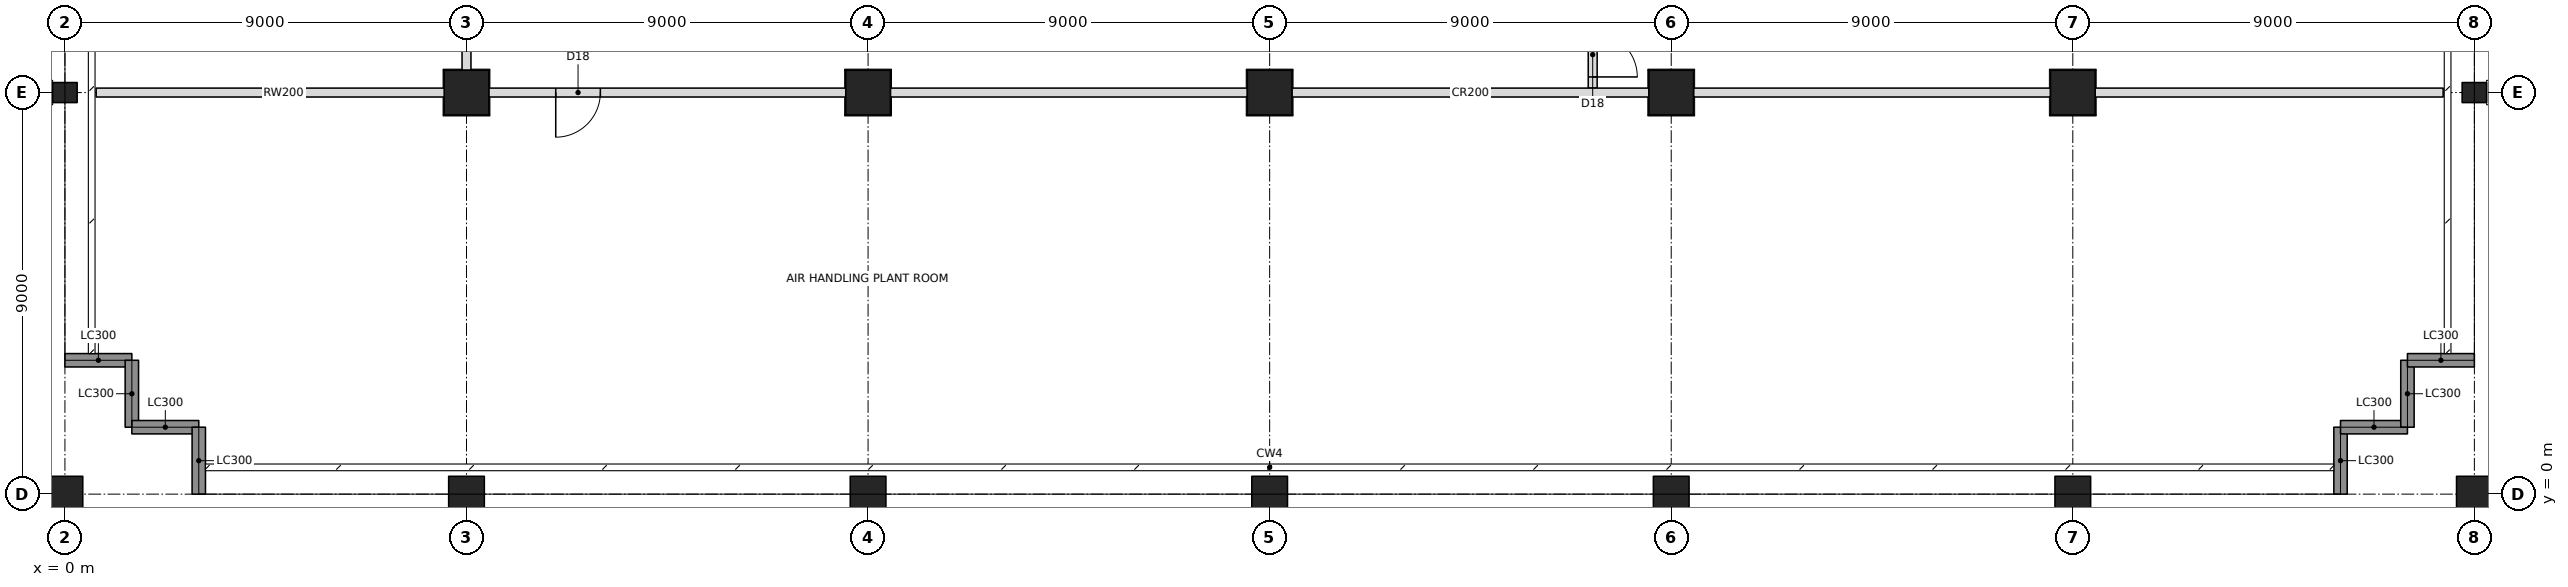
"""IFC4 building model, lengths in metres.
Left out: names, types, materials, properties, quantities, classifications, styles, units other than length and angle.
Written with IfcOpenShell. Run it as: python <this file> out.ifc"""

import sys

from ifc_helpers import new_model, si_unit, direction, frame, frame_2d, origin, origin_with_axes, origin_2d, place, context, subcontext, project, spatial, rectangle, hollow_rectangle, i_section, extrude, element, fill, save


model = new_model("IFC4")
c1 = context("Model", 3, precision=1e-05, world=origin(), true_north=direction((0.0, 1.0)))
c2 = subcontext(c1, "Body", "Model", "MODEL_VIEW")
j1 = project(units=[si_unit("LENGTHUNIT", "METRE"), si_unit("PLANEANGLEUNIT", "RADIAN")], contexts=[c1])
p1 = place(None, origin())
s1 = spatial("IfcSite", under=j1, at=p1, CompositionType="ELEMENT")
p2 = place(p1, origin())
s2 = spatial("IfcBuilding", under=s1, at=p2, CompositionType="ELEMENT")
p3 = place(p2, frame((0.0, 0.0, 89.2)))
s3 = spatial("IfcBuildingStorey", under=s2, at=p3, CompositionType="ELEMENT", Elevation=89.2)
p4 = place(p3, origin_with_axes())
e1 = element("IfcColumn", 1, at=p4, inside=s3, PredefinedType="COLUMN", context=c2, shape_type="SweptSolid", body=[
    extrude(hollow_rectangle(XDim=0.8, YDim=0.8, WallThickness=0.07, at=origin_2d()), origin(), (0.0, 0.0, 1.0), 5.0),
])
p5 = place(p3, frame((0.0, 9.0, 0.0), z_axis=(0.0, 0.0, 1.0), x_axis=(0.0, 1.0, 0.0)))
e2 = element("IfcColumn", 2, at=p5, inside=s3, PredefinedType="COLUMN", context=c2, shape_type="SweptSolid", body=[
    extrude(i_section(OverallWidth=0.449, OverallDepth=0.549, WebThickness=0.072, FlangeThickness=0.115, at=origin_2d()), origin(), (0.0, 0.0, 1.0), 5.0),
])
p6 = place(p3, frame((9.0, 0.0, 0.0), z_axis=(0.0, 0.0, 1.0), x_axis=(1.0, 0.0, 0.0)))
e3 = element("IfcColumn", 3, at=p6, inside=s3, PredefinedType="COLUMN", context=c2, shape_type="SweptSolid", body=[
    extrude(hollow_rectangle(XDim=0.8, YDim=0.8, WallThickness=0.07, at=origin_2d()), origin(), (0.0, 0.0, 1.0), 5.0),
])
p7 = place(p3, frame((9.0, 9.0, 0.0), z_axis=(0.0, 0.0, 1.0), x_axis=(1.0, 0.0, 0.0)))
e4 = element("IfcColumn", 4, at=p7, inside=s3, PredefinedType="COLUMN", context=c2, shape_type="SweptSolid", body=[
    extrude(hollow_rectangle(XDim=1.0, YDim=1.0, WallThickness=0.1, at=origin_2d()), origin(), (0.0, 0.0, 1.0), 5.0),
])
p8 = place(p3, frame((18.0, 0.0, 0.0), z_axis=(0.0, 0.0, 1.0), x_axis=(1.0, 0.0, 0.0)))
e5 = element("IfcColumn", 5, at=p8, inside=s3, PredefinedType="COLUMN", context=c2, shape_type="SweptSolid", body=[
    extrude(hollow_rectangle(XDim=0.8, YDim=0.8, WallThickness=0.07, at=origin_2d()), origin(), (0.0, 0.0, 1.0), 5.0),
])
p9 = place(p3, frame((18.0, 9.0, 0.0), z_axis=(0.0, 0.0, 1.0), x_axis=(1.0, 0.0, 0.0)))
e6 = element("IfcColumn", 6, at=p9, inside=s3, PredefinedType="COLUMN", context=c2, shape_type="SweptSolid", body=[
    extrude(hollow_rectangle(XDim=1.0, YDim=1.0, WallThickness=0.1, at=origin_2d()), origin(), (0.0, 0.0, 1.0), 5.0),
])
p10 = place(p3, frame((27.0, 0.0, 0.0), z_axis=(0.0, 0.0, 1.0), x_axis=(1.0, 0.0, 0.0)))
e7 = element("IfcColumn", 7, at=p10, inside=s3, PredefinedType="COLUMN", context=c2, shape_type="SweptSolid", body=[
    extrude(hollow_rectangle(XDim=0.8, YDim=0.8, WallThickness=0.07, at=origin_2d()), origin(), (0.0, 0.0, 1.0), 5.0),
])
p11 = place(p3, frame((27.0, 9.0, 0.0), z_axis=(0.0, 0.0, 1.0), x_axis=(1.0, 0.0, 0.0)))
e8 = element("IfcColumn", 8, at=p11, inside=s3, PredefinedType="COLUMN", context=c2, shape_type="SweptSolid", body=[
    extrude(hollow_rectangle(XDim=1.0, YDim=1.0, WallThickness=0.1, at=origin_2d()), origin(), (0.0, 0.0, 1.0), 5.0),
])
p12 = place(p3, frame((36.0, 0.0, 0.0), z_axis=(0.0, 0.0, 1.0), x_axis=(1.0, 0.0, 0.0)))
e9 = element("IfcColumn", 9, at=p12, inside=s3, PredefinedType="COLUMN", context=c2, shape_type="SweptSolid", body=[
    extrude(hollow_rectangle(XDim=0.8, YDim=0.8, WallThickness=0.07, at=origin_2d()), origin(), (0.0, 0.0, 1.0), 5.0),
])
p13 = place(p3, frame((36.0, 9.0, 0.0), z_axis=(0.0, 0.0, 1.0), x_axis=(0.0, 1.0, 0.0)))
e10 = element("IfcColumn", 10, at=p13, inside=s3, PredefinedType="COLUMN", context=c2, shape_type="SweptSolid", body=[
    extrude(hollow_rectangle(XDim=1.0, YDim=1.0, WallThickness=0.1, at=origin_2d()), origin(), (0.0, 0.0, 1.0), 5.0),
])
p14 = place(p3, frame((45.0, 0.0, 0.0), z_axis=(0.0, 0.0, 1.0), x_axis=(1.0, 0.0, 0.0)))
e11 = element("IfcColumn", 11, at=p14, inside=s3, PredefinedType="COLUMN", context=c2, shape_type="SweptSolid", body=[
    extrude(hollow_rectangle(XDim=0.8, YDim=0.8, WallThickness=0.07, at=origin_2d()), origin(), (0.0, 0.0, 1.0), 5.0),
])
p15 = place(p3, frame((45.0, 9.0, 0.0), z_axis=(0.0, 0.0, 1.0), x_axis=(0.0, 1.0, 0.0)))
e12 = element("IfcColumn", 12, at=p15, inside=s3, PredefinedType="COLUMN", context=c2, shape_type="SweptSolid", body=[
    extrude(hollow_rectangle(XDim=1.0, YDim=1.0, WallThickness=0.1, at=origin_2d()), origin(), (0.0, 0.0, 1.0), 5.0),
])
p16 = place(p3, frame((54.0, 0.0, 0.0), z_axis=(0.0, 0.0, 1.0), x_axis=(1.0, 0.0, 0.0)))
e13 = element("IfcColumn", 13, at=p16, inside=s3, PredefinedType="COLUMN", context=c2, shape_type="SweptSolid", body=[
    extrude(hollow_rectangle(XDim=0.8, YDim=0.8, WallThickness=0.07, at=origin_2d()), origin(), (0.0, 0.0, 1.0), 5.0),
])
p17 = place(p3, frame((54.0, 9.0, 0.0), z_axis=(0.0, 0.0, 1.0), x_axis=(0.0, 1.0, 0.0)))
e14 = element("IfcColumn", 14, at=p17, inside=s3, PredefinedType="COLUMN", context=c2, shape_type="SweptSolid", body=[
    extrude(i_section(OverallWidth=0.449, OverallDepth=0.549, WebThickness=0.072, FlangeThickness=0.115, at=origin_2d()), origin(), (0.0, 0.0, 1.0), 5.0),
])
p18 = place(p3, frame((51.0, 0.0, 0.0), z_axis=(0.0, 0.0, 1.0), x_axis=(0.0, 1.0, 0.0)))
e15 = element("IfcWall", 15, at=p18, inside=s3, PredefinedType="SOLIDWALL", context=c2, shape_type="SweptSolid", body=[
    extrude(rectangle(XDim=1.5, YDim=0.3, at=frame_2d((0.75, 0.0))), origin(), (0.0, 0.0, 1.0), 3.852),
])
for number, where, z_axis, x_axis in (
    (16, (51.0, 1.5, 0.0), (0.0, 0.0, 1.0), (1.0, 0.0, 0.0)),
    (17, (52.5, 1.5, 0.0), (0.0, 0.0, 1.0), (0.0, 1.0, 0.0)),
):
    element("IfcWall", number, at=place(p3, frame(where, z_axis=z_axis, x_axis=x_axis)), inside=s3, PredefinedType="SOLIDWALL", context=c2, shape_type="SweptSolid", body=[
        extrude(rectangle(XDim=1.5, YDim=0.3, at=frame_2d((0.75, 0.0))), origin(), (0.0, 0.0, 1.0), 4.8),
    ])
for number, where, z_axis, x_axis in (
    (18, (52.5, 3.0, 0.0), (0.0, 0.0, 1.0), (1.0, 0.0, 0.0)),
    (19, (0.0, 3.0, 0.0), (0.0, 0.0, 1.0), (1.0, 0.0, 0.0)),
):
    element("IfcWall", number, at=place(p3, frame(where, z_axis=z_axis, x_axis=x_axis)), inside=s3, PredefinedType="SOLIDWALL", context=c2, shape_type="SweptSolid", body=[
        extrude(rectangle(XDim=1.5, YDim=0.3, at=frame_2d((0.75, 0.0))), origin(), (0.0, 0.0, 1.0), 3.852),
    ])
for number, where, z_axis, x_axis in (
    (20, (1.5, 3.0, 0.0), (0.0, 0.0, 1.0), (0.0, -1.0, 0.0)),
    (21, (1.5, 1.5, 0.0), (0.0, 0.0, 1.0), (1.0, 0.0, 0.0)),
):
    element("IfcWall", number, at=place(p3, frame(where, z_axis=z_axis, x_axis=x_axis)), inside=s3, PredefinedType="SOLIDWALL", context=c2, shape_type="SweptSolid", body=[
        extrude(rectangle(XDim=1.5, YDim=0.3, at=frame_2d((0.75, 0.0))), origin(), (0.0, 0.0, 1.0), 4.8),
    ])
p19 = place(p3, frame((3.0, 1.5, 0.0), z_axis=(0.0, 0.0, 1.0), x_axis=(0.0, -1.0, 0.0)))
e22 = element("IfcWall", 22, at=p19, inside=s3, PredefinedType="SOLIDWALL", context=c2, shape_type="SweptSolid", body=[
    extrude(rectangle(XDim=1.5, YDim=0.3, at=frame_2d((0.75, 0.0))), origin(), (0.0, 0.0, 1.0), 3.852),
])
p20 = place(p3, frame((9.0, 9.5, 0.0), z_axis=(0.0, 0.0, 1.0), x_axis=(0.0, 1.0, 0.0)))
e23 = element("IfcWall", 23, at=p20, inside=s3, PredefinedType="PARTITIONING", context=c2, shape_type="SweptSolid", body=[
    extrude(rectangle(XDim=8.0, YDim=0.2, at=frame_2d((4.0, 0.0))), origin(), (0.0, 0.0, 1.0), 4.005),
])
p21 = place(p20, frame((2.5, 0.0, 0.0)))
e24 = element("IfcOpeningElement", 24, at=p21, cuts=e23, PredefinedType="OPENING", context=c2, shape_type="SweptSolid", body=[
    extrude(rectangle(XDim=1.0, YDim=2.1, at=frame_2d((0.5, 1.05))), frame((0.0, 0.11, 0.0), z_axis=(0.0, -1.0, 0.0), x_axis=(1.0, 0.0, 0.0)), (0.0, 0.0, 1.0), 0.22),
])
p22 = place(p3, frame((0.7, 9.0, 0.0), z_axis=(0.0, 0.0, 1.0), x_axis=(1.0, 0.0, 0.0)))
e25 = element("IfcWall", 25, at=p22, inside=s3, PredefinedType="PARTITIONING", context=c2, shape_type="SweptSolid", body=[
    extrude(rectangle(XDim=8.4, YDim=0.2, at=frame_2d((4.2, 0.0))), origin(), (0.0, 0.0, 1.0), 4.005),
])
p23 = place(p3, frame((9.5, 9.0, 0.0), z_axis=(0.0, 0.0, 1.0), x_axis=(1.0, 0.0, 0.0)))
e26 = element("IfcWall", 26, at=p23, inside=s3, PredefinedType="PARTITIONING", context=c2, shape_type="SweptSolid", body=[
    extrude(rectangle(XDim=8.0, YDim=0.2, at=frame_2d((4.0, 0.0))), origin(), (0.0, 0.0, 1.0), 4.005),
])
p24 = place(p23, frame((1.5, 0.0, 0.0)))
e27 = element("IfcOpeningElement", 27, at=p24, cuts=e26, PredefinedType="OPENING", context=c2, shape_type="SweptSolid", body=[
    extrude(rectangle(XDim=1.0, YDim=2.1, at=frame_2d((0.5, 1.05))), frame((0.0, 0.11, 0.0), z_axis=(0.0, -1.0, 0.0), x_axis=(1.0, 0.0, 0.0)), (0.0, 0.0, 1.0), 0.22),
])
for number, where, z_axis, x_axis in (
    (28, (18.5, 9.0, 0.0), (0.0, 0.0, 1.0), (1.0, 0.0, 0.0)),
    (29, (27.5, 9.0, 0.0), (0.0, 0.0, 1.0), (1.0, 0.0, 0.0)),
):
    element("IfcWall", number, at=place(p3, frame(where, z_axis=z_axis, x_axis=x_axis)), inside=s3, PredefinedType="PARTITIONING", context=c2, shape_type="SweptSolid", body=[
        extrude(rectangle(XDim=8.0, YDim=0.2, at=frame_2d((4.0, 0.0))), origin(), (0.0, 0.0, 1.0), 4.005),
    ])
p25 = place(p3, frame((36.5, 9.0, 0.0), z_axis=(0.0, 0.0, 1.0), x_axis=(1.0, 0.0, 0.0)))
e30 = element("IfcWall", 30, at=p25, inside=s3, PredefinedType="PARTITIONING", context=c2, shape_type="SweptSolid", body=[
    extrude(rectangle(XDim=8.0, YDim=0.2, at=frame_2d((4.0, 0.0))), origin(), (0.0, 0.0, 1.0), 4.038),
])
p26 = place(p3, frame((45.5, 9.0, 0.0), z_axis=(0.0, 0.0, 1.0), x_axis=(1.0, 0.0, 0.0)))
e31 = element("IfcWall", 31, at=p26, inside=s3, PredefinedType="PARTITIONING", context=c2, shape_type="SweptSolid", body=[
    extrude(rectangle(XDim=7.8, YDim=0.2, at=frame_2d((3.9, 0.0))), origin(), (0.0, 0.0, 1.0), 4.038),
])
p27 = place(p3, frame((34.24, 9.1, 0.0), z_axis=(0.0, 0.0, 1.0), x_axis=(0.0, 1.0, 0.0)))
e32 = element("IfcWall", 32, at=p27, inside=s3, PredefinedType="PARTITIONING", context=c2, shape_type="SweptSolid", body=[
    extrude(rectangle(XDim=1.7, YDim=0.2, at=frame_2d((0.85, 0.0))), origin(), (0.0, 0.0, 1.0), 4.004),
])
p28 = place(p27, frame((0.25, 0.0, 0.0)))
e33 = element("IfcOpeningElement", 33, at=p28, cuts=e32, PredefinedType="OPENING", context=c2, shape_type="SweptSolid", body=[
    extrude(rectangle(XDim=1.0, YDim=2.1, at=frame_2d((0.5, 1.05))), frame((0.0, 0.11, 0.0), z_axis=(0.0, -1.0, 0.0), x_axis=(1.0, 0.0, 0.0)), (0.0, 0.0, 1.0), 0.22),
])
p29 = place(p24, frame((1.0, 0.0, 0.0), z_axis=(0.0, 0.0, 1.0), x_axis=(-1.0, 0.0, 0.0)))
e34 = element("IfcDoor", 34, at=p29, inside=s3, OperationType="SINGLE_SWING_RIGHT", PredefinedType="DOOR", context=c2, shape_type="SweptSolid", body=[
    extrude(rectangle(XDim=1.0, YDim=2.1, at=frame_2d((0.5, 1.05))), frame((0.0, 0.025, 0.0), z_axis=(0.0, -1.0, 0.0), x_axis=(1.0, 0.0, 0.0)), (0.0, 0.0, 1.0), 0.05),
])
fill(e27, e34)
p30 = place(p28, frame((1.0, 0.0, 0.0), z_axis=(0.0, 0.0, 1.0), x_axis=(-1.0, 0.0, 0.0)))
e35 = element("IfcDoor", 35, at=p30, inside=s3, OperationType="SINGLE_SWING_RIGHT", PredefinedType="DOOR", context=c2, shape_type="SweptSolid", body=[
    extrude(rectangle(XDim=1.0, YDim=2.1, at=frame_2d((0.5, 1.05))), frame((0.0, 0.025, 0.0), z_axis=(0.0, -1.0, 0.0), x_axis=(1.0, 0.0, 0.0)), (0.0, 0.0, 1.0), 0.05),
])
fill(e33, e35)
save(model, sys.argv[1])
